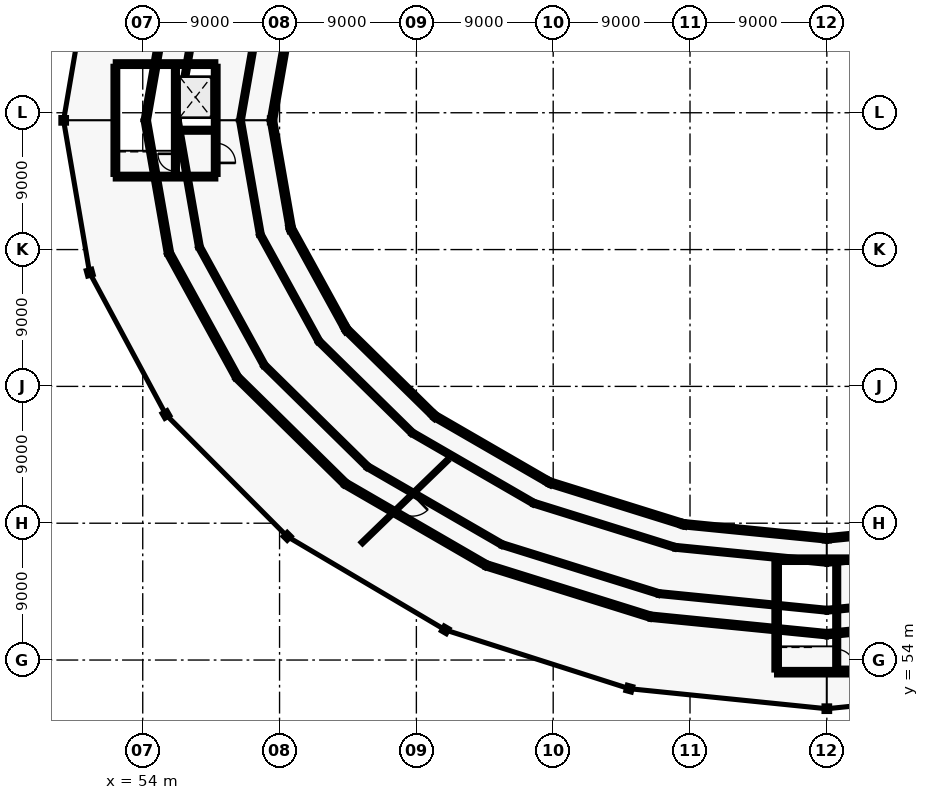
"""IFC4 building model, lengths in metres.
Left out: names, types, materials, properties, quantities, classifications, styles, units other than length and angle.
Written with IfcOpenShell. Run it as: python <this file> out.ifc"""

import sys

from ifc_helpers import new_model, si_unit, direction, frame, frame_2d, origin, origin_2d, place, context, subcontext, project, spatial, rectangle, hollow_circle, extrude, element, fill, save


model = new_model("IFC4")
c1 = context("Model", 3, precision=1e-05, world=origin(), true_north=direction((0.0, 1.0)))
c2 = subcontext(c1, "Body", "Model", "MODEL_VIEW")
j1 = project(units=[si_unit("LENGTHUNIT", "METRE"), si_unit("PLANEANGLEUNIT", "RADIAN")], contexts=[c1])
p1 = place(None, origin())
s1 = spatial("IfcSite", under=j1, at=p1, CompositionType="ELEMENT")
p2 = place(p1, origin())
s2 = spatial("IfcBuilding", under=s1, at=p2, CompositionType="ELEMENT")
p3 = place(p2, frame((0.0, 0.0, 9.6)))
s3 = spatial("IfcBuildingStorey", under=s2, at=p3, CompositionType="ELEMENT", Elevation=9.6)
p4 = place(p3, frame((62.5, 89.5, 0.0), z_axis=(0.0, 0.0, 1.0), x_axis=(-1.0, 0.0, 0.0)))
e1 = element("IfcColumn", 1, at=p4, inside=s3, PredefinedType="COLUMN", context=c2, shape_type="SweptSolid", body=[
    extrude(hollow_circle(Radius=0.162, WallThickness=0.016, at=origin_2d()), origin(), (0.0, 0.0, 1.0), 4.38),
])
p5 = place(p3, frame((48.8, 89.5, 0.0), z_axis=(0.0, 0.0, 1.0), x_axis=(-1.0, 0.0, 0.0)))
e2 = element("IfcColumn", 2, at=p5, inside=s3, PredefinedType="COLUMN", context=c2, shape_type="SweptSolid", body=[
    extrude(hollow_circle(Radius=0.178, WallThickness=0.016, at=origin_2d()), origin(), (0.0, 0.0, 1.0), 3.38),
])
p6 = place(p3, frame((63.744, 82.382, 0.0), z_axis=(0.0, 0.0, 1.0), x_axis=(-0.965925826289, -0.258819045103, 0.0)))
e3 = element("IfcColumn", 3, at=p6, inside=s3, PredefinedType="COLUMN", context=c2, shape_type="SweptSolid", body=[
    extrude(hollow_circle(Radius=0.162, WallThickness=0.016, at=origin_2d()), origin(), (0.0, 0.0, 1.0), 4.38),
])
p7 = place(p3, frame((50.511, 79.484, 0.0), z_axis=(0.0, 0.0, 1.0), x_axis=(-0.965925826289, -0.258819045103, 0.0)))
e4 = element("IfcColumn", 4, at=p7, inside=s3, PredefinedType="COLUMN", context=c2, shape_type="SweptSolid", body=[
    extrude(hollow_circle(Radius=0.178, WallThickness=0.016, at=origin_2d()), origin(), (0.0, 0.0, 1.0), 3.38),
])
p8 = place(p3, frame((67.39, 75.75, 0.0), z_axis=(0.0, 0.0, 1.0), x_axis=(-0.866025403784, -0.5, 0.0)))
e5 = element("IfcColumn", 5, at=p8, inside=s3, PredefinedType="COLUMN", context=c2, shape_type="SweptSolid", body=[
    extrude(hollow_circle(Radius=0.162, WallThickness=0.016, at=origin_2d()), origin(), (0.0, 0.0, 1.0), 4.38),
])
p9 = place(p3, frame((55.526, 70.15, 0.0), z_axis=(0.0, 0.0, 1.0), x_axis=(-0.866025403784, -0.5, 0.0)))
e6 = element("IfcColumn", 6, at=p9, inside=s3, PredefinedType="COLUMN", context=c2, shape_type="SweptSolid", body=[
    extrude(hollow_circle(Radius=0.178, WallThickness=0.016, at=origin_2d()), origin(), (0.0, 0.0, 1.0), 3.38),
])
p10 = place(p3, frame((73.191, 70.055, 0.0), z_axis=(0.0, 0.0, 1.0), x_axis=(-0.707106781187, -0.707106781187, 0.0)))
e7 = element("IfcColumn", 7, at=p10, inside=s3, PredefinedType="COLUMN", context=c2, shape_type="SweptSolid", body=[
    extrude(hollow_circle(Radius=0.162, WallThickness=0.016, at=origin_2d()), origin(), (0.0, 0.0, 1.0), 4.38),
])
p11 = place(p3, frame((63.503, 62.135, 0.0), z_axis=(0.0, 0.0, 1.0), x_axis=(-0.707106781187, -0.707106781187, 0.0)))
e8 = element("IfcColumn", 8, at=p11, inside=s3, PredefinedType="COLUMN", context=c2, shape_type="SweptSolid", body=[
    extrude(hollow_circle(Radius=0.178, WallThickness=0.016, at=origin_2d()), origin(), (0.0, 0.0, 1.0), 3.38),
])
p12 = place(p3, frame((80.75, 65.684, 0.0), z_axis=(0.0, 0.0, 1.0), x_axis=(-0.5, -0.866025403784, 0.0)))
e9 = element("IfcColumn", 9, at=p12, inside=s3, PredefinedType="COLUMN", context=c2, shape_type="SweptSolid", body=[
    extrude(hollow_circle(Radius=0.162, WallThickness=0.016, at=origin_2d()), origin(), (0.0, 0.0, 1.0), 4.38),
])
p13 = place(p3, frame((73.9, 55.985, 0.0), z_axis=(0.0, 0.0, 1.0), x_axis=(-0.5, -0.866025403784, 0.0)))
e10 = element("IfcColumn", 10, at=p13, inside=s3, PredefinedType="COLUMN", context=c2, shape_type="SweptSolid", body=[
    extrude(hollow_circle(Radius=0.178, WallThickness=0.016, at=origin_2d()), origin(), (0.0, 0.0, 1.0), 3.38),
])
p14 = place(p3, frame((89.553, 62.937, 0.0), z_axis=(0.0, 0.0, 1.0), x_axis=(-0.258819045103, -0.965925826289, 0.0)))
e11 = element("IfcColumn", 11, at=p14, inside=s3, PredefinedType="COLUMN", context=c2, shape_type="SweptSolid", body=[
    extrude(hollow_circle(Radius=0.162, WallThickness=0.016, at=origin_2d()), origin(), (0.0, 0.0, 1.0), 4.38),
])
p15 = place(p3, frame((86.007, 52.119, 0.0), z_axis=(0.0, 0.0, 1.0), x_axis=(-0.258819045103, -0.965925826289, 0.0)))
e12 = element("IfcColumn", 12, at=p15, inside=s3, PredefinedType="COLUMN", context=c2, shape_type="SweptSolid", body=[
    extrude(hollow_circle(Radius=0.178, WallThickness=0.016, at=origin_2d()), origin(), (0.0, 0.0, 1.0), 3.38),
])
p16 = place(p3, frame((99.0, 62.0, 0.0), z_axis=(0.0, 0.0, 1.0), x_axis=(0.0, -1.0, 0.0)))
e13 = element("IfcColumn", 13, at=p16, inside=s3, PredefinedType="COLUMN", context=c2, shape_type="SweptSolid", body=[
    extrude(hollow_circle(Radius=0.162, WallThickness=0.016, at=origin_2d()), origin(), (0.0, 0.0, 1.0), 4.38),
])
p17 = place(p3, frame((99.0, 50.8, 0.0), z_axis=(0.0, 0.0, 1.0), x_axis=(0.0, -1.0, 0.0)))
e14 = element("IfcColumn", 14, at=p17, inside=s3, PredefinedType="COLUMN", context=c2, shape_type="SweptSolid", body=[
    extrude(hollow_circle(Radius=0.178, WallThickness=0.016, at=origin_2d()), origin(), (0.0, 0.0, 1.0), 3.38),
])
p18 = place(p3, frame((55.727, 98.248, 4.53), z_axis=(0.0, 0.0, 1.0), x_axis=(-0.171964181022, -0.985103202941, 0.0)))
e15 = element("IfcWall", 15, at=p18, inside=s3, PredefinedType="SOLIDWALL", context=c2, shape_type="SweptSolid", body=[
    extrude(rectangle(XDim=8.88, YDim=0.34, at=frame_2d((4.44, 0.0))), origin(), (0.0, 0.0, 1.0), 3.02),
])
p19 = place(p3, frame((63.744, 96.618, 4.39), z_axis=(0.0, 0.0, 1.0), x_axis=(-0.172146745201, -0.985071316259, 0.0)))
e16 = element("IfcWall", 16, at=p19, inside=s3, PredefinedType="SOLIDWALL", context=c2, shape_type="SweptSolid", body=[
    extrude(rectangle(XDim=7.226, YDim=0.34, at=frame_2d((3.613, 0.0))), origin(), (0.0, 0.0, 1.0), 3.16),
])
p20 = place(p3, frame((57.731, 97.84, 7.58), z_axis=(0.0, 0.0, 1.0), x_axis=(-0.171983700119, -0.985099795398, 0.0)))
e17 = element("IfcWall", 17, at=p20, inside=s3, PredefinedType="SOLIDWALL", context=c2, shape_type="SweptSolid", body=[
    extrude(rectangle(XDim=8.466, YDim=0.24, at=frame_2d((4.233, 0.0))), origin(), (0.0, 0.0, 1.0), 2.37),
])
p21 = place(p3, frame((61.739, 97.025, 7.58), z_axis=(0.0, 0.0, 1.0), x_axis=(-0.172012838792, -0.985094707777, 0.0)))
e18 = element("IfcWall", 18, at=p21, inside=s3, PredefinedType="SOLIDWALL", context=c2, shape_type="SweptSolid", body=[
    extrude(rectangle(XDim=7.639, YDim=0.24, at=frame_2d((3.819, 0.0))), origin(), (0.0, 0.0, 1.0), 2.37),
])
p22 = place(p3, frame((54.2, 89.5, 4.53), z_axis=(0.0, 0.0, 1.0), x_axis=(0.171964181022, -0.985103202941, 0.0)))
e19 = element("IfcWall", 19, at=p22, inside=s3, PredefinedType="SOLIDWALL", context=c2, shape_type="SweptSolid", body=[
    extrude(rectangle(XDim=8.88, YDim=0.34, at=frame_2d((4.44, 0.0))), origin(), (0.0, 0.0, 1.0), 3.02),
])
p23 = place(p3, frame((62.5, 89.5, 4.39), z_axis=(0.0, 0.0, 1.0), x_axis=(0.172146745201, -0.985071316259, 0.0)))
e20 = element("IfcWall", 20, at=p23, inside=s3, PredefinedType="SOLIDWALL", context=c2, shape_type="SweptSolid", body=[
    extrude(rectangle(XDim=7.226, YDim=0.34, at=frame_2d((3.613, 0.0))), origin(), (0.0, 0.0, 1.0), 3.16),
])
p24 = place(p3, frame((56.275, 89.5, 7.58), z_axis=(0.0, 0.0, 1.0), x_axis=(0.171983700119, -0.985099795398, 0.0)))
e21 = element("IfcWall", 21, at=p24, inside=s3, PredefinedType="SOLIDWALL", context=c2, shape_type="SweptSolid", body=[
    extrude(rectangle(XDim=8.466, YDim=0.24, at=frame_2d((4.233, 0.0))), origin(), (0.0, 0.0, 1.0), 2.37),
])
p25 = place(p3, frame((60.425, 89.5, 7.58), z_axis=(0.0, 0.0, 1.0), x_axis=(0.172012838792, -0.985094707777, 0.0)))
e22 = element("IfcWall", 22, at=p25, inside=s3, PredefinedType="SOLIDWALL", context=c2, shape_type="SweptSolid", body=[
    extrude(rectangle(XDim=7.639, YDim=0.24, at=frame_2d((3.819, 0.0))), origin(), (0.0, 0.0, 1.0), 2.37),
])
p26 = place(p3, frame((55.727, 80.752, 4.53), z_axis=(0.0, 0.0, 1.0), x_axis=(0.481203038707, -0.876609169208, 0.0)))
e23 = element("IfcWall", 23, at=p26, inside=s3, PredefinedType="SOLIDWALL", context=c2, shape_type="SweptSolid", body=[
    extrude(rectangle(XDim=9.299, YDim=0.34, at=frame_2d((4.65, 0.0))), origin(), (0.0, 0.0, 1.0), 3.02),
])
p27 = place(p3, frame((63.744, 82.382, 4.39), z_axis=(0.0, 0.0, 1.0), x_axis=(0.481751565348, -0.876307839338, 0.0)))
e24 = element("IfcWall", 24, at=p27, inside=s3, PredefinedType="SOLIDWALL", context=c2, shape_type="SweptSolid", body=[
    extrude(rectangle(XDim=7.568, YDim=0.34, at=frame_2d((3.784, 0.0))), origin(), (0.0, 0.0, 1.0), 3.16),
])
p28 = place(p3, frame((57.731, 81.16, 7.58), z_axis=(0.0, 0.0, 1.0), x_axis=(0.48130775835, -0.876551676601, 0.0)))
e25 = element("IfcWall", 25, at=p28, inside=s3, PredefinedType="SOLIDWALL", context=c2, shape_type="SweptSolid", body=[
    extrude(rectangle(XDim=8.868, YDim=0.24, at=frame_2d((4.434, 0.0))), origin(), (0.0, 0.0, 1.0), 2.37),
])
p29 = place(p3, frame((61.739, 81.975, 7.58), z_axis=(0.0, 0.0, 1.0), x_axis=(0.481607192972, -0.876387192785, 0.0)))
e26 = element("IfcWall", 26, at=p29, inside=s3, PredefinedType="SOLIDWALL", context=c2, shape_type="SweptSolid", body=[
    extrude(rectangle(XDim=8.002, YDim=0.24, at=frame_2d((4.001, 0.0))), origin(), (0.0, 0.0, 1.0), 2.37),
])
p30 = place(p3, frame((60.202, 72.6, 4.53), z_axis=(0.0, 0.0, 1.0), x_axis=(0.713096204455, -0.701066190307, 0.0)))
e27 = element("IfcWall", 27, at=p30, inside=s3, PredefinedType="SOLIDWALL", context=c2, shape_type="SweptSolid", body=[
    extrude(rectangle(XDim=9.985, YDim=0.34, at=frame_2d((4.992, 0.0))), origin(), (0.0, 0.0, 1.0), 3.02),
])
p31 = place(p3, frame((67.39, 75.75, 4.39), z_axis=(0.0, 0.0, 1.0), x_axis=(0.713593723838, -0.700559774251, 0.0)))
e28 = element("IfcWall", 28, at=p31, inside=s3, PredefinedType="SOLIDWALL", context=c2, shape_type="SweptSolid", body=[
    extrude(rectangle(XDim=8.129, YDim=0.34, at=frame_2d((4.065, 0.0))), origin(), (0.0, 0.0, 1.0), 3.16),
])
p32 = place(p3, frame((61.999, 73.387, 7.58), z_axis=(0.0, 0.0, 1.0), x_axis=(0.713170660677, -0.700990448401, 0.0)))
e29 = element("IfcWall", 29, at=p32, inside=s3, PredefinedType="SOLIDWALL", context=c2, shape_type="SweptSolid", body=[
    extrude(rectangle(XDim=9.521, YDim=0.24, at=frame_2d((4.76, 0.0))), origin(), (0.0, 0.0, 1.0), 2.37),
])
p33 = place(p3, frame((65.593, 74.962, 7.58), z_axis=(0.0, 0.0, 1.0), x_axis=(0.713414677491, -0.700742105157, 0.0)))
e30 = element("IfcWall", 30, at=p33, inside=s3, PredefinedType="SOLIDWALL", context=c2, shape_type="SweptSolid", body=[
    extrude(rectangle(XDim=8.592, YDim=0.24, at=frame_2d((4.296, 0.0))), origin(), (0.0, 0.0, 1.0), 2.37),
])
p34 = place(p3, frame((67.322, 65.6, 4.53), z_axis=(0.0, 0.0, 1.0), x_axis=(0.865403937833, -0.501074869039, 0.0)))
e31 = element("IfcWall", 31, at=p34, inside=s3, PredefinedType="SOLIDWALL", context=c2, shape_type="SweptSolid", body=[
    extrude(rectangle(XDim=10.721, YDim=0.34, at=frame_2d((5.361, 0.0))), origin(), (0.0, 0.0, 1.0), 3.02),
])
p35 = place(p3, frame((73.191, 70.055, 4.39), z_axis=(0.0, 0.0, 1.0), x_axis=(0.865697347457, -0.500567780231, 0.0)))
e32 = element("IfcWall", 32, at=p35, inside=s3, PredefinedType="SOLIDWALL", context=c2, shape_type="SweptSolid", body=[
    extrude(rectangle(XDim=8.732, YDim=0.34, at=frame_2d((4.366, 0.0))), origin(), (0.0, 0.0, 1.0), 3.16),
])
p36 = place(p3, frame((68.789, 66.713, 7.58), z_axis=(0.0, 0.0, 1.0), x_axis=(0.865494949489, -0.500917650328, 0.0)))
e33 = element("IfcWall", 33, at=p36, inside=s3, PredefinedType="SOLIDWALL", context=c2, shape_type="SweptSolid", body=[
    extrude(rectangle(XDim=10.223, YDim=0.24, at=frame_2d((5.111, 0.0))), origin(), (0.0, 0.0, 1.0), 2.37),
])
p37 = place(p3, frame((71.723, 68.941, 7.58), z_axis=(0.0, 0.0, 1.0), x_axis=(0.865631472937, -0.500681688362, 0.0)))
e34 = element("IfcWall", 34, at=p37, inside=s3, PredefinedType="SOLIDWALL", context=c2, shape_type="SweptSolid", body=[
    extrude(rectangle(XDim=9.229, YDim=0.24, at=frame_2d((4.615, 0.0))), origin(), (0.0, 0.0, 1.0), 2.37),
])
p38 = place(p3, frame((76.6, 60.228, 4.53), z_axis=(0.0, 0.0, 1.0), x_axis=(0.95449417592, -0.298229556107, 0.0)))
e35 = element("IfcWall", 35, at=p38, inside=s3, PredefinedType="SOLIDWALL", context=c2, shape_type="SweptSolid", body=[
    extrude(rectangle(XDim=11.32, YDim=0.34, at=frame_2d((5.66, 0.0))), origin(), (0.0, 0.0, 1.0), 3.02),
])
p39 = place(p3, frame((80.75, 65.684, 4.39), z_axis=(0.0, 0.0, 1.0), x_axis=(0.9545990852, -0.297893582568, 0.0)))
e36 = element("IfcWall", 36, at=p39, inside=s3, PredefinedType="SOLIDWALL", context=c2, shape_type="SweptSolid", body=[
    extrude(rectangle(XDim=9.222, YDim=0.34, at=frame_2d((4.611, 0.0))), origin(), (0.0, 0.0, 1.0), 3.16),
])
p40 = place(p3, frame((77.637, 61.592, 7.58), z_axis=(0.0, 0.0, 1.0), x_axis=(0.954514174424, -0.298165542651, 0.0)))
e37 = element("IfcWall", 37, at=p40, inside=s3, PredefinedType="SOLIDWALL", context=c2, shape_type="SweptSolid", body=[
    extrude(rectangle(XDim=10.796, YDim=0.24, at=frame_2d((5.398, 0.0))), origin(), (0.0, 0.0, 1.0), 2.37),
])
p41 = place(p3, frame((79.712, 64.32, 7.58), z_axis=(0.0, 0.0, 1.0), x_axis=(0.954582431614, -0.29794694369, 0.0)))
e38 = element("IfcWall", 38, at=p41, inside=s3, PredefinedType="SOLIDWALL", context=c2, shape_type="SweptSolid", body=[
    extrude(rectangle(XDim=9.747, YDim=0.24, at=frame_2d((4.874, 0.0))), origin(), (0.0, 0.0, 1.0), 2.37),
])
p42 = place(p3, frame((87.405, 56.852, 4.53), z_axis=(0.0, 0.0, 1.0), x_axis=(0.995099849345, -0.098875122419, 0.0)))
e39 = element("IfcWall", 39, at=p42, inside=s3, PredefinedType="SOLIDWALL", context=c2, shape_type="SweptSolid", body=[
    extrude(rectangle(XDim=11.652, YDim=0.34, at=frame_2d((5.826, 0.0))), origin(), (0.0, 0.0, 1.0), 3.02),
])
p43 = place(p3, frame((89.553, 62.937, 4.39), z_axis=(0.0, 0.0, 1.0), x_axis=(0.995117073258, -0.098701623651, 0.0)))
e40 = element("IfcWall", 40, at=p43, inside=s3, PredefinedType="SOLIDWALL", context=c2, shape_type="SweptSolid", body=[
    extrude(rectangle(XDim=9.493, YDim=0.34, at=frame_2d((4.747, 0.0))), origin(), (0.0, 0.0, 1.0), 3.16),
])
p44 = place(p3, frame((87.942, 58.373, 7.58), z_axis=(0.0, 0.0, 1.0), x_axis=(0.995105258288, -0.098820670548, 0.0)))
e41 = element("IfcWall", 41, at=p44, inside=s3, PredefinedType="SOLIDWALL", context=c2, shape_type="SweptSolid", body=[
    extrude(rectangle(XDim=11.113, YDim=0.24, at=frame_2d((5.556, 0.0))), origin(), (0.0, 0.0, 1.0), 2.37),
])
p45 = place(p3, frame((89.016, 61.416, 7.58), z_axis=(0.0, 0.0, 1.0), x_axis=(0.995110163253, -0.098771266021, 0.0)))
e42 = element("IfcWall", 42, at=p45, inside=s3, PredefinedType="SOLIDWALL", context=c2, shape_type="SweptSolid", body=[
    extrude(rectangle(XDim=10.033, YDim=0.24, at=frame_2d((5.017, 0.0))), origin(), (0.0, 0.0, 1.0), 2.37),
])
p46 = place(p3, frame((99.0, 55.7, 4.53), z_axis=(0.0, 0.0, 1.0), x_axis=(0.995099849345, 0.098875122419, 0.0)))
e43 = element("IfcWall", 43, at=p46, inside=s3, PredefinedType="SOLIDWALL", context=c2, shape_type="SweptSolid", body=[
    extrude(rectangle(XDim=11.652, YDim=0.34, at=frame_2d((5.826, 0.0))), origin(), (0.0, 0.0, 1.0), 3.02),
])
p47 = place(p3, frame((99.0, 62.0, 4.39), z_axis=(0.0, 0.0, 1.0), x_axis=(0.995117073258, 0.098701623651, 0.0)))
e44 = element("IfcWall", 44, at=p47, inside=s3, PredefinedType="SOLIDWALL", context=c2, shape_type="SweptSolid", body=[
    extrude(rectangle(XDim=9.493, YDim=0.34, at=frame_2d((4.747, 0.0))), origin(), (0.0, 0.0, 1.0), 3.16),
])
p48 = place(p3, frame((99.0, 57.275, 7.58), z_axis=(0.0, 0.0, 1.0), x_axis=(0.995105258288, 0.098820670548, 0.0)))
e45 = element("IfcWall", 45, at=p48, inside=s3, PredefinedType="SOLIDWALL", context=c2, shape_type="SweptSolid", body=[
    extrude(rectangle(XDim=11.113, YDim=0.24, at=frame_2d((5.556, 0.0))), origin(), (0.0, 0.0, 1.0), 2.37),
])
p49 = place(p3, frame((99.0, 60.425, 7.58), z_axis=(0.0, 0.0, 1.0), x_axis=(0.995110163253, 0.098771266021, 0.0)))
e46 = element("IfcWall", 46, at=p49, inside=s3, PredefinedType="SOLIDWALL", context=c2, shape_type="SweptSolid", body=[
    extrude(rectangle(XDim=10.033, YDim=0.24, at=frame_2d((5.017, 0.0))), origin(), (0.0, 0.0, 1.0), 2.37),
])
for number, where, z_axis, x_axis in (
    (47, (52.2, 85.8, 0.0), (0.0, 0.0, 1.0), (1.0, 0.0, 0.0)),
    (48, (52.2, 93.2, 0.0), (0.0, 0.0, 1.0), (1.0, 0.0, 0.0)),
):
    element("IfcWall", number, at=place(p3, frame(where, z_axis=z_axis, x_axis=x_axis)), inside=s3, PredefinedType="SHEAR", context=c2, shape_type="SweptSolid", body=[
        extrude(rectangle(XDim=6.6, YDim=0.3, at=frame_2d((3.3, 0.0))), origin(), (0.0, 0.0, 1.0), 3.4),
    ])
p50 = place(p3, frame((52.2, 85.95, 0.0), z_axis=(0.0, 0.0, 1.0), x_axis=(0.0, 1.0, 0.0)))
e49 = element("IfcWall", 49, at=p50, inside=s3, PredefinedType="SHEAR", context=c2, shape_type="SweptSolid", body=[
    extrude(rectangle(XDim=7.1, YDim=0.3, at=frame_2d((3.55, 0.0))), origin(), (0.0, 0.0, 1.0), 3.4),
])
p51 = place(p3, frame((58.8, 85.95, 0.0), z_axis=(0.0, 0.0, 1.0), x_axis=(0.0, 1.0, 0.0)))
e50 = element("IfcWall", 50, at=p51, inside=s3, PredefinedType="SHEAR", context=c2, shape_type="SweptSolid", body=[
    extrude(rectangle(XDim=7.1, YDim=0.3, at=frame_2d((3.55, 0.0))), origin(), (0.0, 0.0, 1.0), 3.4),
])
p52 = place(p51, frame((0.75, 0.0, 0.0)))
e51 = element("IfcOpeningElement", 51, at=p52, cuts=e50, PredefinedType="OPENING", context=c2, shape_type="SweptSolid", body=[
    extrude(rectangle(XDim=1.3, YDim=2.15, at=frame_2d((0.65, 1.075))), frame((0.0, 0.16, 0.0), z_axis=(0.0, -1.0, 0.0), x_axis=(1.0, 0.0, 0.0)), (0.0, 0.0, 1.0), 0.32),
])
p53 = place(p3, frame((56.15, 85.95, 0.0), z_axis=(0.0, 0.0, 1.0), x_axis=(0.0, 1.0, 0.0)))
e52 = element("IfcWall", 52, at=p53, inside=s3, PredefinedType="SHEAR", context=c2, shape_type="SweptSolid", body=[
    extrude(rectangle(XDim=7.1, YDim=0.25, at=frame_2d((3.55, 0.0))), origin(), (0.0, 0.0, 1.0), 3.4),
])
p54 = place(p53, frame((0.2, 0.0, 0.0)))
e53 = element("IfcOpeningElement", 53, at=p54, cuts=e52, PredefinedType="OPENING", context=c2, shape_type="SweptSolid", body=[
    extrude(rectangle(XDim=1.15, YDim=2.15, at=frame_2d((0.575, 1.075))), frame((0.0, 0.135, 0.0), z_axis=(0.0, -1.0, 0.0), x_axis=(1.0, 0.0, 0.0)), (0.0, 0.0, 1.0), 0.27),
])
p55 = place(p3, frame((56.27, 88.85, 0.0), z_axis=(0.0, 0.0, 1.0), x_axis=(1.0, 0.0, 0.0)))
e54 = element("IfcWall", 54, at=p55, inside=s3, PredefinedType="SHEAR", context=c2, shape_type="SweptSolid", body=[
    extrude(rectangle(XDim=2.38, YDim=0.25, at=frame_2d((1.19, 0.0))), origin(), (0.0, 0.0, 1.0), 3.4),
])
p56 = place(p55, frame((0.39, 0.0, 0.0)))
e55 = element("IfcOpeningElement", 55, at=p56, cuts=e54, PredefinedType="OPENING", context=c2, shape_type="SweptSolid", body=[
    extrude(rectangle(XDim=1.6, YDim=2.3, at=frame_2d((0.8, 1.15))), frame((0.0, 0.135, 0.0), z_axis=(0.0, -1.0, 0.0), x_axis=(1.0, 0.0, 0.0)), (0.0, 0.0, 1.0), 0.27),
])
for number, where, z_axis, x_axis in (
    (56, (95.7, 53.2, 0.0), (0.0, 0.0, 1.0), (1.0, 0.0, 0.0)),
    (57, (95.7, 60.6, 0.0), (0.0, 0.0, 1.0), (1.0, 0.0, 0.0)),
):
    element("IfcWall", number, at=place(p3, frame(where, z_axis=z_axis, x_axis=x_axis)), inside=s3, PredefinedType="SHEAR", context=c2, shape_type="SweptSolid", body=[
        extrude(rectangle(XDim=6.6, YDim=0.35, at=frame_2d((3.3, 0.0))), origin(), (0.0, 0.0, 1.0), 3.4),
    ])
p57 = place(p3, frame((95.7, 53.35, 0.0), z_axis=(0.0, 0.0, 1.0), x_axis=(0.0, 1.0, 0.0)))
e58 = element("IfcWall", 58, at=p57, inside=s3, PredefinedType="SHEAR", context=c2, shape_type="SweptSolid", body=[
    extrude(rectangle(XDim=7.1, YDim=0.35, at=frame_2d((3.55, 0.0))), origin(), (0.0, 0.0, 1.0), 3.4),
])
p58 = place(p3, frame((99.65, 53.35, 0.0), z_axis=(0.0, 0.0, 1.0), x_axis=(0.0, 1.0, 0.0)))
e59 = element("IfcWall", 59, at=p58, inside=s3, PredefinedType="SHEAR", context=c2, shape_type="SweptSolid", body=[
    extrude(rectangle(XDim=7.1, YDim=0.25, at=frame_2d((3.55, 0.0))), origin(), (0.0, 0.0, 1.0), 3.4),
])
p59 = place(p58, frame((0.2, 0.0, 0.0)))
e60 = element("IfcOpeningElement", 60, at=p59, cuts=e59, PredefinedType="OPENING", context=c2, shape_type="SweptSolid", body=[
    extrude(rectangle(XDim=1.15, YDim=2.15, at=frame_2d((0.575, 1.075))), frame((0.0, 0.135, 0.0), z_axis=(0.0, -1.0, 0.0), x_axis=(1.0, 0.0, 0.0)), (0.0, 0.0, 1.0), 0.27),
])
p60 = place(p3, frame((74.028, 67.127, 0.0), z_axis=(0.0, 0.0, 1.0), x_axis=(-0.718851460144, -0.695163706078, 0.0)))
e61 = element("IfcWall", 61, at=p60, inside=s3, PredefinedType="PARTITIONING", context=c2, shape_type="SweptSolid", body=[
    extrude(rectangle(XDim=7.812, YDim=0.13, at=frame_2d((3.906, 0.0))), origin(), (0.0, 0.0, 1.0), 2.9),
])
p61 = place(p60, frame((3.181, 0.0, 0.0)))
e62 = element("IfcOpeningElement", 62, at=p61, cuts=e61, PredefinedType="OPENING", context=c2, shape_type="SweptSolid", body=[
    extrude(rectangle(XDim=1.45, YDim=2.15, at=frame_2d((0.725, 1.075))), frame((0.0, 0.075, 0.0), z_axis=(0.0, -1.0, 0.0), x_axis=(1.0, 0.0, 0.0)), (0.0, 0.0, 1.0), 0.15),
])
p62 = place(p52, frame((1.3, 0.0, 0.0), z_axis=(0.0, 0.0, 1.0), x_axis=(-1.0, 0.0, 0.0)))
e63 = element("IfcDoor", 63, at=p62, inside=s3, OperationType="DOUBLE_DOOR_SINGLE_SWING", PredefinedType="DOOR", context=c2, shape_type="SweptSolid", body=[
    extrude(rectangle(XDim=1.3, YDim=2.15, at=frame_2d((0.65, 1.075))), frame((0.0, 0.025, 0.0), z_axis=(0.0, -1.0, 0.0), x_axis=(1.0, 0.0, 0.0)), (0.0, 0.0, 1.0), 0.05),
])
fill(e51, e63)
p63 = place(p54, frame((1.15, 0.0, 0.0), z_axis=(0.0, 0.0, 1.0), x_axis=(-1.0, 0.0, 0.0)))
e64 = element("IfcDoor", 64, at=p63, inside=s3, OperationType="SINGLE_SWING_RIGHT", PredefinedType="DOOR", context=c2, shape_type="SweptSolid", body=[
    extrude(rectangle(XDim=1.15, YDim=2.15, at=frame_2d((0.575, 1.075))), frame((0.0, 0.025, 0.0), z_axis=(0.0, -1.0, 0.0), x_axis=(1.0, 0.0, 0.0)), (0.0, 0.0, 1.0), 0.05),
])
fill(e53, e64)
p64 = place(p56, origin())
e65 = element("IfcDoor", 65, at=p64, inside=s3, OperationType="SLIDING_TO_LEFT", PredefinedType="DOOR", context=c2, shape_type="SweptSolid", body=[
    extrude(rectangle(XDim=1.6, YDim=2.3, at=frame_2d((0.8, 1.15))), frame((0.0, 0.025, 0.0), z_axis=(0.0, -1.0, 0.0), x_axis=(1.0, 0.0, 0.0)), (0.0, 0.0, 1.0), 0.05),
])
fill(e55, e65)
p65 = place(p59, frame((1.15, 0.0, 0.0), z_axis=(0.0, 0.0, 1.0), x_axis=(-1.0, 0.0, 0.0)))
e66 = element("IfcDoor", 66, at=p65, inside=s3, OperationType="SINGLE_SWING_LEFT", PredefinedType="DOOR", context=c2, shape_type="SweptSolid", body=[
    extrude(rectangle(XDim=1.15, YDim=2.15, at=frame_2d((0.575, 1.075))), frame((0.0, 0.025, 0.0), z_axis=(0.0, -1.0, 0.0), x_axis=(1.0, 0.0, 0.0)), (0.0, 0.0, 1.0), 0.05),
])
fill(e60, e66)
p66 = place(p61, origin())
e67 = element("IfcDoor", 67, at=p66, inside=s3, OperationType="SINGLE_SWING_LEFT", PredefinedType="DOOR", context=c2, shape_type="SweptSolid", body=[
    extrude(rectangle(XDim=1.45, YDim=2.15, at=frame_2d((0.725, 1.075))), frame((0.0, 0.025, 0.0), z_axis=(0.0, -1.0, 0.0), x_axis=(1.0, 0.0, 0.0)), (0.0, 0.0, 1.0), 0.05),
])
fill(e62, e67)
save(model, sys.argv[1])
